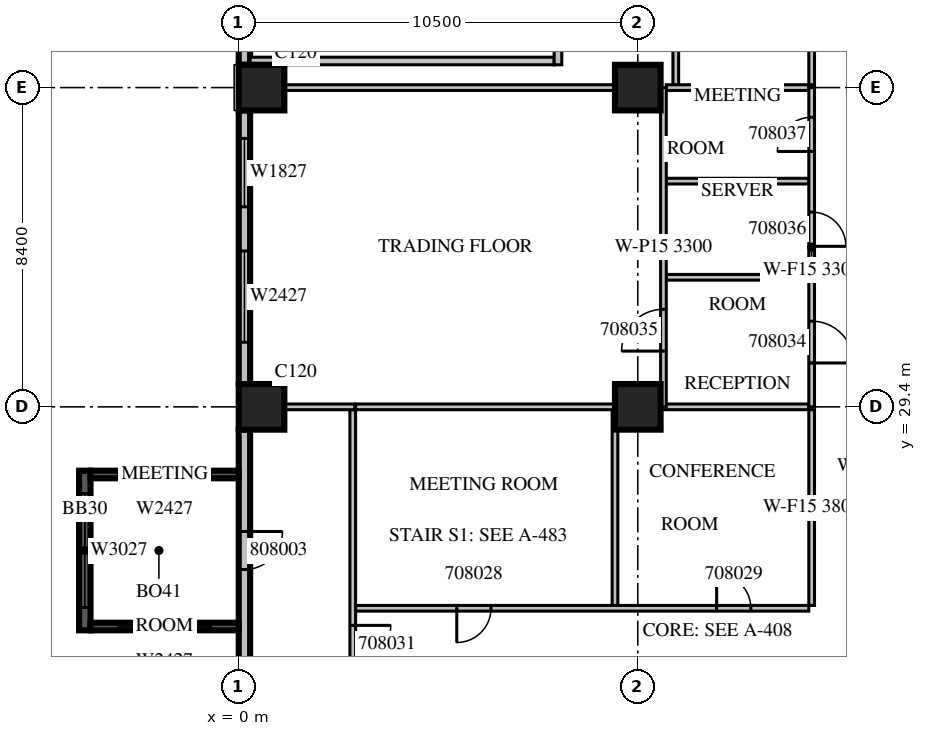
"""IFC4 building model, lengths in metres.
Left out: names, types, materials, properties, quantities, classifications, styles, units other than length and angle.
Written with IfcOpenShell. Run it as: python <this file> out.ifc"""

import sys

from ifc_helpers import new_model, si_unit, direction, frame, frame_2d, origin, origin_2d, place, context, subcontext, project, spatial, rectangle, extrude, source, transform, mapped, element, fill, save


model = new_model("IFC4")
c1 = context("Model", 3, precision=1e-05, world=origin(), true_north=direction((0.0, 1.0)))
c2 = subcontext(c1, "Body", "Model", "MODEL_VIEW")
j1 = project(units=[si_unit("LENGTHUNIT", "METRE"), si_unit("PLANEANGLEUNIT", "RADIAN")], contexts=[c1])
p1 = place(None, origin())
s1 = spatial("IfcSite", under=j1, at=p1, CompositionType="ELEMENT")
p2 = place(p1, origin())
s2 = spatial("IfcBuilding", under=s1, at=p2, CompositionType="ELEMENT")
p3 = place(p2, frame((0.0, 0.0, 44.7)))
s3 = spatial("IfcBuildingStorey", under=s2, at=p3, CompositionType="ELEMENT", Elevation=44.7)
m1 = source(origin(), c2, "Body", "SweptSolid", [
    extrude(rectangle(XDim=1.2, YDim=1.2, at=origin_2d()), origin(), (0.0, 0.0, 1.0), 4.2),
])
for number, where, z_axis, x_axis in (
    (1, (0.6, 29.4, 0.0), (0.0, 0.0, 1.0), (1.0, 0.0, 0.0)),
    (2, (10.5, 29.4, 0.0), (0.0, 0.0, 1.0), (1.0, 0.0, 0.0)),
    (3, (0.6, 37.8, 0.0), (0.0, 0.0, 1.0), (1.0, 0.0, 0.0)),
    (4, (10.5, 37.8, 0.0), (0.0, 0.0, 1.0), (1.0, 0.0, 0.0)),
):
    element("IfcColumn", number, at=place(p3, frame(where, z_axis=z_axis, x_axis=x_axis)), inside=s3, PredefinedType="COLUMN", context=c2, shape_type="MappedRepresentation", body=[
        mapped(m1, transform((0.0, 0.0, 0.0), scale=1.0)),
    ])
m2 = source(origin(), c2, "Body", "SweptSolid", [
    extrude(rectangle(XDim=1.8, YDim=0.3, at=frame_2d((0.9, 0.0))), origin(), (0.0, 0.0, 1.0), 3.8),
])
p4 = place(p3, frame((0.15, 40.2, 0.0), z_axis=(0.0, 0.0, 1.0), x_axis=(0.0, -1.0, 0.0)))
e5 = element("IfcWall", 5, at=p4, inside=s3, PredefinedType="STANDARD", context=c2, shape_type="MappedRepresentation", body=[
    mapped(m2, transform((0.0, 0.0, 0.0), scale=1.0)),
])
m3 = source(origin(), c2, "Body", "SweptSolid", [
    extrude(rectangle(XDim=7.2, YDim=0.3, at=frame_2d((3.6, 0.0))), origin(), (0.0, 0.0, 1.0), 3.8),
])
p5 = place(p3, frame((0.15, 37.2, 0.0), z_axis=(0.0, 0.0, 1.0), x_axis=(0.0, -1.0, 0.0)))
e6 = element("IfcWall", 6, at=p5, inside=s3, PredefinedType="STANDARD", context=c2, shape_type="MappedRepresentation", body=[
    mapped(m3, transform((0.0, 0.0, 0.0), scale=1.0)),
])
m4 = source(origin(), c2, "Body", "SweptSolid", [
    extrude(rectangle(XDim=1.8, YDim=2.7, at=frame_2d((0.9, 1.35))), frame((0.0, 0.16, 0.0), z_axis=(0.0, -1.0, 0.0), x_axis=(1.0, 0.0, 0.0)), (0.0, 0.0, 1.0), 0.32),
])
p6 = place(p5, frame((0.738, 0.0, 0.6)))
e7 = element("IfcOpeningElement", 7, at=p6, cuts=e6, PredefinedType="OPENING", context=c2, shape_type="MappedRepresentation", body=[
    mapped(m4, transform((0.0, 0.0, 0.0), scale=1.0)),
])
m5 = source(origin(), c2, "Body", "SweptSolid", [
    extrude(rectangle(XDim=2.4, YDim=2.7, at=frame_2d((1.2, 1.35))), frame((0.0, 0.16, 0.0), z_axis=(0.0, -1.0, 0.0), x_axis=(1.0, 0.0, 0.0)), (0.0, 0.0, 1.0), 0.32),
])
p7 = place(p5, frame((3.7, 0.0, 0.6)))
e8 = element("IfcOpeningElement", 8, at=p7, cuts=e6, PredefinedType="OPENING", context=c2, shape_type="MappedRepresentation", body=[
    mapped(m5, transform((0.0, 0.0, 0.0), scale=1.0)),
])
p8 = place(p3, frame((0.15, 28.8, 0.0), z_axis=(0.0, 0.0, 1.0), x_axis=(0.0, -1.0, 0.0)))
e9 = element("IfcWall", 9, at=p8, inside=s3, PredefinedType="STANDARD", context=c2, shape_type="MappedRepresentation", body=[
    mapped(m3, transform((0.0, 0.0, 0.0), scale=1.0)),
])
m6 = source(origin(), c2, "Body", "SweptSolid", [
    extrude(rectangle(XDim=1.0, YDim=2.1, at=frame_2d((0.5, 1.05))), frame((0.0, 0.16, 0.0), z_axis=(0.0, -1.0, 0.0), x_axis=(1.0, 0.0, 0.0)), (0.0, 0.0, 1.0), 0.32),
])
p9 = place(p8, frame((2.68, 0.0, 0.0)))
e10 = element("IfcOpeningElement", 10, at=p9, cuts=e9, PredefinedType="OPENING", context=c2, shape_type="MappedRepresentation", body=[
    mapped(m6, transform((0.0, 0.0, 0.0), scale=1.0)),
])
p10 = place(p3, frame((-4.05, 27.72, 0.0), z_axis=(0.0, 0.0, 1.0), x_axis=(0.0, -1.0, 0.0)))
e11 = element("IfcWall", 11, at=p10, inside=s3, PredefinedType="SOLIDWALL", context=c2, shape_type="SweptSolid", body=[
    extrude(rectangle(XDim=4.2, YDim=0.3, at=frame_2d((2.1, 0.0))), origin(), (0.0, 0.0, 1.0), 3.79),
])
m7 = source(origin(), c2, "Body", "SweptSolid", [
    extrude(rectangle(XDim=3.0, YDim=2.7, at=frame_2d((1.5, 1.35))), frame((0.0, 0.16, 0.0), z_axis=(0.0, -1.0, 0.0), x_axis=(1.0, 0.0, 0.0)), (0.0, 0.0, 1.0), 0.32),
])
p11 = place(p10, frame((0.6, 0.0, 0.6)))
e12 = element("IfcOpeningElement", 12, at=p11, cuts=e11, PredefinedType="OPENING", context=c2, shape_type="MappedRepresentation", body=[
    mapped(m7, transform((0.0, 0.0, 0.0), scale=1.0)),
])
m8 = source(origin(), c2, "Body", "SweptSolid", [
    extrude(rectangle(XDim=3.9, YDim=0.2, at=frame_2d((1.95, 0.0))), origin(), (0.0, 0.0, 1.0), 3.79),
])
p12 = place(p3, frame((0.0, 27.62, 0.0), z_axis=(0.0, 0.0, 1.0), x_axis=(-1.0, 0.0, 0.0)))
e13 = element("IfcWall", 13, at=p12, inside=s3, PredefinedType="SOLIDWALL", context=c2, shape_type="MappedRepresentation", body=[
    mapped(m8, transform((0.0, 0.0, 0.0), scale=1.0)),
])
m9 = source(origin(), c2, "Body", "SweptSolid", [
    extrude(rectangle(XDim=2.4, YDim=2.7, at=frame_2d((1.2, 1.35))), frame((0.0, 0.11, 0.0), z_axis=(0.0, -1.0, 0.0), x_axis=(1.0, 0.0, 0.0)), (0.0, 0.0, 1.0), 0.22),
])
p13 = place(p12, frame((0.75, 0.0, 0.6)))
e14 = element("IfcOpeningElement", 14, at=p13, cuts=e13, PredefinedType="OPENING", context=c2, shape_type="MappedRepresentation", body=[
    mapped(m9, transform((0.0, 0.0, 0.0), scale=1.0)),
])
p14 = place(p3, frame((0.0, 23.62, 0.0), z_axis=(0.0, 0.0, 1.0), x_axis=(-1.0, 0.0, 0.0)))
e15 = element("IfcWall", 15, at=p14, inside=s3, PredefinedType="SOLIDWALL", context=c2, shape_type="MappedRepresentation", body=[
    mapped(m8, transform((0.0, 0.0, 0.0), scale=1.0)),
])
p15 = place(p14, frame((0.75, 0.0, 0.6)))
e16 = element("IfcOpeningElement", 16, at=p15, cuts=e15, PredefinedType="OPENING", context=c2, shape_type="MappedRepresentation", body=[
    mapped(m9, transform((0.0, 0.0, 0.0), scale=1.0)),
])
m10 = source(origin(), c2, "Body", "SweptSolid", [
    extrude(rectangle(XDim=8.0, YDim=0.2, at=frame_2d((4.0, 0.0))), origin(), (0.0, 0.0, 1.0), 3.8),
])
p16 = place(p3, frame((0.3, 38.5, 0.0), z_axis=(0.0, 0.0, 1.0), x_axis=(1.0, 0.0, 0.0)))
e17 = element("IfcWall", 17, at=p16, inside=s3, PredefinedType="PARTITIONING", context=c2, shape_type="MappedRepresentation", body=[
    mapped(m10, transform((0.0, 0.0, 0.0), scale=1.0)),
])
m11 = source(origin(), c2, "Body", "SweptSolid", [
    extrude(rectangle(XDim=5.45, YDim=0.2, at=frame_2d((2.725, 0.0))), origin(), (0.0, 0.0, 1.0), 3.8),
])
p17 = place(p3, frame((8.4, 38.4, 0.0), z_axis=(0.0, 0.0, 1.0), x_axis=(0.0, 1.0, 0.0)))
e18 = element("IfcWall", 18, at=p17, inside=s3, PredefinedType="PARTITIONING", context=c2, shape_type="MappedRepresentation", body=[
    mapped(m11, transform((0.0, 0.0, 0.0), scale=1.0)),
])
m12 = source(origin(), c2, "Body", "SweptSolid", [
    extrude(rectangle(XDim=1.2, YDim=2.1, at=frame_2d((0.6, 1.05))), frame((0.0, 0.11, 0.0), z_axis=(0.0, -1.0, 0.0), x_axis=(1.0, 0.0, 0.0)), (0.0, 0.0, 1.0), 0.22),
])
p18 = place(p17, frame((0.4, 0.0, 0.0)))
e19 = element("IfcOpeningElement", 19, at=p18, cuts=e18, PredefinedType="OPENING", context=c2, shape_type="MappedRepresentation", body=[
    mapped(m12, transform((0.0, 0.0, 0.0), scale=1.0)),
])
m13 = source(origin(), c2, "Body", "SweptSolid", [
    extrude(rectangle(XDim=0.9, YDim=2.1, at=frame_2d((0.45, 1.05))), frame((0.0, 0.11, 0.0), z_axis=(0.0, -1.0, 0.0), x_axis=(1.0, 0.0, 0.0)), (0.0, 0.0, 1.0), 0.22),
])
p19 = place(p17, frame((3.25, 0.0, 0.0)))
e20 = element("IfcOpeningElement", 20, at=p19, cuts=e18, PredefinedType="OPENING", context=c2, shape_type="MappedRepresentation", body=[
    mapped(m13, transform((0.0, 0.0, 0.0), scale=1.0)),
])
m14 = source(origin(), c2, "Body", "SweptSolid", [
    extrude(rectangle(XDim=11.925, YDim=0.15, at=frame_2d((5.963, 0.0))), origin(), (0.0, 0.0, 1.0), 3.8),
])
p20 = place(p3, frame((3.075, 24.1, 0.0), z_axis=(0.0, 0.0, 1.0), x_axis=(1.0, 0.0, 0.0)))
e21 = element("IfcWall", 21, at=p20, inside=s3, PredefinedType="PARTITIONING", context=c2, shape_type="MappedRepresentation", body=[
    mapped(m14, transform((0.0, 0.0, 0.0), scale=1.0)),
])
m15 = source(origin(), c2, "Body", "SweptSolid", [
    extrude(rectangle(XDim=0.9, YDim=2.1, at=frame_2d((0.45, 1.05))), frame((0.0, 0.085, 0.0), z_axis=(0.0, -1.0, 0.0), x_axis=(1.0, 0.0, 0.0)), (0.0, 0.0, 1.0), 0.17),
])
p21 = place(p20, frame((2.663, 0.0, 0.0)))
e22 = element("IfcOpeningElement", 22, at=p21, cuts=e21, PredefinedType="OPENING", context=c2, shape_type="MappedRepresentation", body=[
    mapped(m15, transform((0.0, 0.0, 0.0), scale=1.0)),
])
p22 = place(p20, frame((9.5, 0.0, 0.0)))
e23 = element("IfcOpeningElement", 23, at=p22, cuts=e21, PredefinedType="OPENING", context=c2, shape_type="MappedRepresentation", body=[
    mapped(m15, transform((0.0, 0.0, 0.0), scale=1.0)),
])
m16 = source(origin(), c2, "Body", "SweptSolid", [
    extrude(rectangle(XDim=5.15, YDim=0.15, at=frame_2d((2.575, 0.0))), origin(), (0.0, 0.0, 1.0), 3.8),
])
for number, where, z_axis, x_axis in (
    (24, (9.9, 24.175, 0.0), (0.0, 0.0, 1.0), (0.0, 1.0, 0.0)),
    (25, (15.075, 24.175, 0.0), (0.0, 0.0, 1.0), (0.0, 1.0, 0.0)),
):
    element("IfcWall", number, at=place(p3, frame(where, z_axis=z_axis, x_axis=x_axis)), inside=s3, PredefinedType="PARTITIONING", context=c2, shape_type="MappedRepresentation", body=[
        mapped(m16, transform((0.0, 0.0, 0.0), scale=1.0)),
    ])
m17 = source(origin(), c2, "Body", "SweptSolid", [
    extrude(rectangle(XDim=6.826, YDim=0.15, at=frame_2d((3.413, 0.0))), origin(), (0.0, 0.0, 1.0), 3.8),
])
p23 = place(p3, frame((9.901, 29.4, 0.0), z_axis=(0.0, 0.0, 1.0), x_axis=(-1.0, 0.0, 0.0)))
e26 = element("IfcWall", 26, at=p23, inside=s3, PredefinedType="PARTITIONING", context=c2, shape_type="MappedRepresentation", body=[
    mapped(m17, transform((0.0, 0.0, 0.0), scale=1.0)),
])
m18 = source(origin(), c2, "Body", "SweptSolid", [
    extrude(rectangle(XDim=3.901, YDim=0.15, at=frame_2d((1.95, 0.0))), origin(), (0.0, 0.0, 1.0), 3.8),
])
p24 = place(p3, frame((15.0, 29.4, 0.0), z_axis=(0.0, 0.0, 1.0), x_axis=(-1.0, 0.0, 0.0)))
e27 = element("IfcWall", 27, at=p24, inside=s3, PredefinedType="PARTITIONING", context=c2, shape_type="MappedRepresentation", body=[
    mapped(m18, transform((0.0, 0.0, 0.0), scale=1.0)),
])
m19 = source(origin(), c2, "Body", "SweptSolid", [
    extrude(rectangle(XDim=7.125, YDim=0.15, at=frame_2d((3.562, 0.0))), origin(), (0.0, 0.0, 1.0), 3.8),
])
p25 = place(p3, frame((3.0, 29.325, 0.0), z_axis=(0.0, 0.0, 1.0), x_axis=(0.0, -1.0, 0.0)))
e28 = element("IfcWall", 28, at=p25, inside=s3, PredefinedType="PARTITIONING", context=c2, shape_type="MappedRepresentation", body=[
    mapped(m19, transform((0.0, 0.0, 0.0), scale=1.0)),
])
m20 = source(origin(), c2, "Body", "SweptSolid", [
    extrude(rectangle(XDim=1.0, YDim=2.1, at=frame_2d((0.5, 1.05))), frame((0.0, 0.085, 0.0), z_axis=(0.0, -1.0, 0.0), x_axis=(1.0, 0.0, 0.0)), (0.0, 0.0, 1.0), 0.17),
])
p26 = place(p25, frame((5.675, 0.0, 0.0)))
e29 = element("IfcOpeningElement", 29, at=p26, cuts=e28, PredefinedType="OPENING", context=c2, shape_type="MappedRepresentation", body=[
    mapped(m20, transform((0.0, 0.0, 0.0), scale=1.0)),
])
m21 = source(origin(), c2, "Body", "SweptSolid", [
    extrude(rectangle(XDim=6.45, YDim=0.15, at=frame_2d((3.225, 0.0))), origin(), (0.0, 0.0, 1.0), 3.8),
])
p27 = place(p3, frame((11.5, 44.325, 0.0), z_axis=(0.0, 0.0, 1.0), x_axis=(0.0, -1.0, 0.0)))
e30 = element("IfcWall", 30, at=p27, inside=s3, PredefinedType="PARTITIONING", context=c2, shape_type="MappedRepresentation", body=[
    mapped(m21, transform((0.0, 0.0, 0.0), scale=1.0)),
])
p28 = place(p3, frame((15.075, 37.875, 0.0), z_axis=(0.0, 0.0, 1.0), x_axis=(0.0, 1.0, 0.0)))
e31 = element("IfcWall", 31, at=p28, inside=s3, PredefinedType="PARTITIONING", context=c2, shape_type="MappedRepresentation", body=[
    mapped(m21, transform((0.0, 0.0, 0.0), scale=1.0)),
])
p29 = place(p28, frame((2.737, 0.0, 0.0)))
e32 = element("IfcOpeningElement", 32, at=p29, cuts=e31, PredefinedType="OPENING", context=c2, shape_type="MappedRepresentation", body=[
    mapped(m15, transform((0.0, 0.0, 0.0), scale=1.0)),
])
m22 = source(origin(), c2, "Body", "SweptSolid", [
    extrude(rectangle(XDim=3.75, YDim=0.15, at=frame_2d((1.875, 0.0))), origin(), (0.0, 0.0, 1.0), 3.8),
])
for number, where, z_axis, x_axis in (
    (33, (15.0, 32.809, 0.0), (0.0, 0.0, 1.0), (-1.0, 0.0, 0.0)),
    (34, (15.0, 35.339, 0.0), (0.0, 0.0, 1.0), (-1.0, 0.0, 0.0)),
):
    element("IfcWall", number, at=place(p3, frame(where, z_axis=z_axis, x_axis=x_axis)), inside=s3, PredefinedType="PARTITIONING", context=c2, shape_type="MappedRepresentation", body=[
        mapped(m22, transform((0.0, 0.0, 0.0), scale=1.0)),
    ])
m23 = source(origin(), c2, "Body", "SweptSolid", [
    extrude(rectangle(XDim=1.856, YDim=0.15, at=frame_2d((0.928, 0.0))), origin(), (0.0, 0.0, 1.0), 3.8),
])
p30 = place(p3, frame((3.055, 29.4, 0.0), z_axis=(0.0, 0.0, 1.0), x_axis=(-1.0, 0.0, 0.0)))
e35 = element("IfcWall", 35, at=p30, inside=s3, PredefinedType="PARTITIONING", context=c2, shape_type="MappedRepresentation", body=[
    mapped(m23, transform((0.0, 0.0, 0.0), scale=1.0)),
])
m24 = source(origin(), c2, "Body", "SweptSolid", [
    extrude(rectangle(XDim=8.702, YDim=0.15, at=frame_2d((4.351, 0.0))), origin(), (0.0, 0.0, 1.0), 3.8),
])
p31 = place(p3, frame((9.901, 37.8, 0.0), z_axis=(0.0, 0.0, 1.0), x_axis=(-1.0, 0.0, 0.0)))
e36 = element("IfcWall", 36, at=p31, inside=s3, PredefinedType="PARTITIONING", context=c2, shape_type="MappedRepresentation", body=[
    mapped(m24, transform((0.0, 0.0, 0.0), scale=1.0)),
])
p32 = place(p3, frame((15.0, 37.8, 0.0), z_axis=(0.0, 0.0, 1.0), x_axis=(-1.0, 0.0, 0.0)))
e37 = element("IfcWall", 37, at=p32, inside=s3, PredefinedType="PARTITIONING", context=c2, shape_type="MappedRepresentation", body=[
    mapped(m22, transform((0.0, 0.0, 0.0), scale=1.0)),
])
p33 = place(p3, frame((11.175, 29.4, 0.0), z_axis=(0.0, 0.0, 1.0), x_axis=(0.0, 1.0, 0.0)))
e38 = element("IfcWall", 38, at=p33, inside=s3, PredefinedType="PARTITIONING", context=c2, shape_type="SweptSolid", body=[
    extrude(rectangle(XDim=8.4, YDim=0.15, at=frame_2d((4.2, 0.0))), origin(), (0.0, 0.0, 1.0), 3.3),
])
m25 = source(origin(), c2, "Body", "SweptSolid", [
    extrude(rectangle(XDim=1.1, YDim=2.1, at=frame_2d((0.55, 1.05))), frame((0.0, 0.085, 0.0), z_axis=(0.0, -1.0, 0.0), x_axis=(1.0, 0.0, 0.0)), (0.0, 0.0, 1.0), 0.17),
])
p34 = place(p33, frame((1.467, 0.0, 0.0)))
e39 = element("IfcOpeningElement", 39, at=p34, cuts=e38, PredefinedType="OPENING", context=c2, shape_type="MappedRepresentation", body=[
    mapped(m25, transform((0.0, 0.0, 0.0), scale=1.0)),
])
m26 = source(origin(), c2, "Body", "SweptSolid", [
    extrude(rectangle(XDim=8.4, YDim=0.15, at=frame_2d((4.2, 0.0))), origin(), (0.0, 0.0, 1.0), 3.3),
])
p35 = place(p3, frame((15.075, 29.4, 0.0), z_axis=(0.0, 0.0, 1.0), x_axis=(0.0, 1.0, 0.0)))
e40 = element("IfcWall", 40, at=p35, inside=s3, PredefinedType="PARTITIONING", context=c2, shape_type="MappedRepresentation", body=[
    mapped(m26, transform((0.0, 0.0, 0.0), scale=1.0)),
])
p36 = place(p35, frame((1.154, 0.0, 0.0)))
e41 = element("IfcOpeningElement", 41, at=p36, cuts=e40, PredefinedType="OPENING", context=c2, shape_type="MappedRepresentation", body=[
    mapped(m25, transform((0.0, 0.0, 0.0), scale=1.0)),
])
p37 = place(p35, frame((4.224, 0.0, 0.0)))
e42 = element("IfcOpeningElement", 42, at=p37, cuts=e40, PredefinedType="OPENING", context=c2, shape_type="MappedRepresentation", body=[
    mapped(m15, transform((0.0, 0.0, 0.0), scale=1.0)),
])
p38 = place(p35, frame((6.719, 0.0, 0.0)))
e43 = element("IfcOpeningElement", 43, at=p38, cuts=e40, PredefinedType="OPENING", context=c2, shape_type="MappedRepresentation", body=[
    mapped(m15, transform((0.0, 0.0, 0.0), scale=1.0)),
])
m27 = source(origin(), c2, "Body", "SweptSolid", [
    extrude(rectangle(XDim=1.8, YDim=2.7, at=frame_2d((0.9, 1.35))), frame((0.0, 0.03, 0.0), z_axis=(0.0, -1.0, 0.0), x_axis=(1.0, 0.0, 0.0)), (0.0, 0.0, 1.0), 0.06),
])
p39 = place(p6, origin())
e44 = element("IfcWindow", 44, at=p39, inside=s3, PartitioningType="SINGLE_PANEL", PredefinedType="WINDOW", context=c2, shape_type="MappedRepresentation", body=[
    mapped(m27, transform((0.0, 0.0, 0.0), scale=1.0)),
])
fill(e7, e44)
m28 = source(origin(), c2, "Body", "SweptSolid", [
    extrude(rectangle(XDim=2.4, YDim=2.7, at=frame_2d((1.2, 1.35))), frame((0.0, 0.03, 0.0), z_axis=(0.0, -1.0, 0.0), x_axis=(1.0, 0.0, 0.0)), (0.0, 0.0, 1.0), 0.06),
])
p40 = place(p7, origin())
e45 = element("IfcWindow", 45, at=p40, inside=s3, PartitioningType="SINGLE_PANEL", PredefinedType="WINDOW", context=c2, shape_type="MappedRepresentation", body=[
    mapped(m28, transform((0.0, 0.0, 0.0), scale=1.0)),
])
fill(e8, e45)
m29 = source(origin(), c2, "Body", "SweptSolid", [
    extrude(rectangle(XDim=3.0, YDim=2.7, at=frame_2d((1.5, 1.35))), frame((0.0, 0.03, 0.0), z_axis=(0.0, -1.0, 0.0), x_axis=(1.0, 0.0, 0.0)), (0.0, 0.0, 1.0), 0.06),
])
p41 = place(p11, origin())
e46 = element("IfcWindow", 46, at=p41, inside=s3, PartitioningType="SINGLE_PANEL", PredefinedType="WINDOW", context=c2, shape_type="MappedRepresentation", body=[
    mapped(m29, transform((0.0, 0.0, 0.0), scale=1.0)),
])
fill(e12, e46)
p42 = place(p13, origin())
e47 = element("IfcWindow", 47, at=p42, inside=s3, PartitioningType="SINGLE_PANEL", PredefinedType="WINDOW", context=c2, shape_type="MappedRepresentation", body=[
    mapped(m28, transform((0.0, 0.0, 0.0), scale=1.0)),
])
fill(e14, e47)
p43 = place(p15, origin())
e48 = element("IfcWindow", 48, at=p43, inside=s3, PartitioningType="SINGLE_PANEL", PredefinedType="WINDOW", context=c2, shape_type="MappedRepresentation", body=[
    mapped(m28, transform((0.0, 0.0, 0.0), scale=1.0)),
])
fill(e16, e48)
m30 = source(origin(), c2, "Body", "SweptSolid", [
    extrude(rectangle(XDim=0.9, YDim=2.1, at=frame_2d((0.45, 1.05))), frame((0.0, 0.025, 0.0), z_axis=(0.0, -1.0, 0.0), x_axis=(1.0, 0.0, 0.0)), (0.0, 0.0, 1.0), 0.05),
])
p44 = place(p21, origin())
e49 = element("IfcDoor", 49, at=p44, inside=s3, OperationType="SINGLE_SWING_RIGHT", PredefinedType="DOOR", context=c2, shape_type="MappedRepresentation", body=[
    mapped(m30, transform((0.0, 0.0, 0.0), scale=1.0)),
])
fill(e22, e49)
p45 = place(p22, origin())
e50 = element("IfcDoor", 50, at=p45, inside=s3, OperationType="SINGLE_SWING_LEFT", PredefinedType="DOOR", context=c2, shape_type="MappedRepresentation", body=[
    mapped(m30, transform((0.0, 0.0, 0.0), scale=1.0)),
])
fill(e23, e50)
m31 = source(origin(), c2, "Body", "SweptSolid", [
    extrude(rectangle(XDim=1.0, YDim=2.1, at=frame_2d((0.5, 1.05))), frame((0.0, 0.025, 0.0), z_axis=(0.0, -1.0, 0.0), x_axis=(1.0, 0.0, 0.0)), (0.0, 0.0, 1.0), 0.05),
])
p46 = place(p26, origin())
e51 = element("IfcDoor", 51, at=p46, inside=s3, OperationType="SINGLE_SWING_LEFT", PredefinedType="DOOR", context=c2, shape_type="MappedRepresentation", body=[
    mapped(m31, transform((0.0, 0.0, 0.0), scale=1.0)),
])
fill(e29, e51)
m32 = source(origin(), c2, "Body", "SweptSolid", [
    extrude(rectangle(XDim=1.1, YDim=2.1, at=frame_2d((0.55, 1.05))), frame((0.0, 0.025, 0.0), z_axis=(0.0, -1.0, 0.0), x_axis=(1.0, 0.0, 0.0)), (0.0, 0.0, 1.0), 0.05),
])
p47 = place(p36, origin())
e52 = element("IfcDoor", 52, at=p47, inside=s3, OperationType="SINGLE_SWING_RIGHT", PredefinedType="DOOR", context=c2, shape_type="MappedRepresentation", body=[
    mapped(m32, transform((0.0, 0.0, 0.0), scale=1.0)),
])
fill(e41, e52)
p48 = place(p34, origin())
e53 = element("IfcDoor", 53, at=p48, inside=s3, OperationType="SINGLE_SWING_LEFT", PredefinedType="DOOR", context=c2, shape_type="MappedRepresentation", body=[
    mapped(m32, transform((0.0, 0.0, 0.0), scale=1.0)),
])
fill(e39, e53)
p49 = place(p37, origin())
e54 = element("IfcDoor", 54, at=p49, inside=s3, OperationType="SINGLE_SWING_RIGHT", PredefinedType="DOOR", context=c2, shape_type="MappedRepresentation", body=[
    mapped(m30, transform((0.0, 0.0, 0.0), scale=1.0)),
])
fill(e42, e54)
p50 = place(p38, origin())
e55 = element("IfcDoor", 55, at=p50, inside=s3, OperationType="SINGLE_SWING_LEFT", PredefinedType="DOOR", context=c2, shape_type="MappedRepresentation", body=[
    mapped(m30, transform((0.0, 0.0, 0.0), scale=1.0)),
])
fill(e43, e55)
p51 = place(p9, origin())
e56 = element("IfcDoor", 56, at=p51, inside=s3, OperationType="SINGLE_SWING_LEFT", PredefinedType="DOOR", context=c2, shape_type="MappedRepresentation", body=[
    mapped(m31, transform((0.0, 0.0, 0.0), scale=1.0)),
])
fill(e10, e56)
save(model, sys.argv[1])
